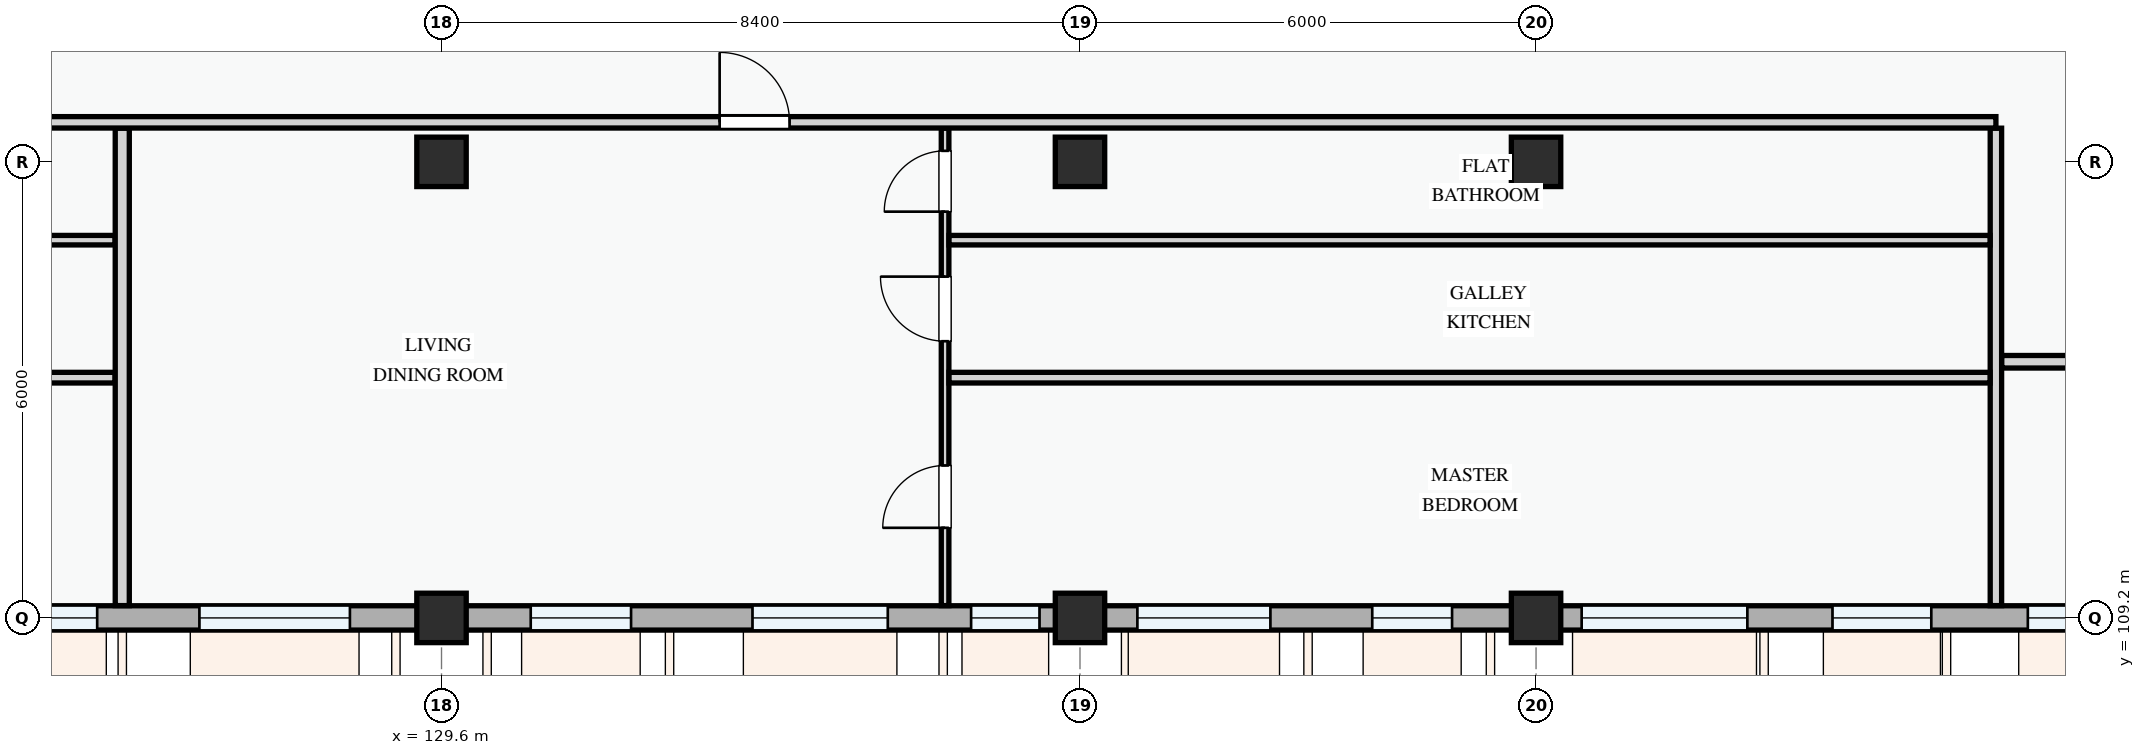
"""IFC4 building model, lengths in metres.
Left out: names, types, materials, properties, quantities, classifications, styles, units other than length and angle.
Written with IfcOpenShell. Run it as: python <this file> out.ifc"""

import sys

from ifc_helpers import new_model, si_unit, direction, frame, frame_2d, origin, origin_2d, place, context, subcontext, project, spatial, rectangle, extrude, element, fill, save


model = new_model("IFC4")
c1 = context("Model", 3, precision=1e-05, world=origin(), true_north=direction((0.0, 1.0)))
c2 = subcontext(c1, "Body", "Model", "MODEL_VIEW")
j1 = project(units=[si_unit("LENGTHUNIT", "METRE"), si_unit("PLANEANGLEUNIT", "RADIAN")], contexts=[c1])
p1 = place(None, origin())
s1 = spatial("IfcSite", under=j1, at=p1, CompositionType="ELEMENT")
p2 = place(p1, origin())
s2 = spatial("IfcBuilding", under=s1, at=p2, CompositionType="ELEMENT")
p3 = place(p2, frame((0.0, 0.0, 18.0)))
s3 = spatial("IfcBuildingStorey", under=s2, at=p3, CompositionType="ELEMENT", Elevation=18.0)
for number, where, z_axis, x_axis in (
    (1, (129.6, 109.2, 0.0), (0.0, 0.0, 1.0), (1.0, 0.0, 0.0)),
    (2, (129.6, 115.2, 0.0), (0.0, 0.0, 1.0), (1.0, 0.0, 0.0)),
    (3, (138.0, 109.2, 0.0), (0.0, 0.0, 1.0), (1.0, 0.0, 0.0)),
    (4, (138.0, 115.2, 0.0), (0.0, 0.0, 1.0), (1.0, 0.0, 0.0)),
    (5, (144.0, 109.2, 0.0), (0.0, 0.0, 1.0), (1.0, 0.0, 0.0)),
    (6, (144.0, 115.2, 0.0), (0.0, 0.0, 1.0), (1.0, 0.0, 0.0)),
):
    element("IfcColumn", number, at=place(p3, frame(where, z_axis=z_axis, x_axis=x_axis)), inside=s3, PredefinedType="COLUMN", context=c2, shape_type="SweptSolid", body=[
        extrude(rectangle(XDim=0.65, YDim=0.65, at=origin_2d()), origin(), (0.0, 0.0, 1.0), 3.3),
    ])
p4 = place(p3, frame((123.6, 109.2, 0.0), z_axis=(0.0, 0.0, 1.0), x_axis=(1.0, 0.0, 0.0)))
e7 = element("IfcWall", 7, at=p4, inside=s3, PredefinedType="STANDARD", context=c2, shape_type="SweptSolid", body=[
    extrude(rectangle(XDim=6.0, YDim=0.32, at=frame_2d((3.0, 0.0))), origin(), (0.0, 0.0, 1.0), 2.475),
])
p5 = place(p4, frame((0.52, 0.0, 0.78)))
e8 = element("IfcOpeningElement", 8, at=p5, cuts=e7, PredefinedType="OPENING", context=c2, shape_type="SweptSolid", body=[
    extrude(rectangle(XDim=0.95, YDim=1.15, at=frame_2d((0.475, 0.575))), frame((0.0, 0.17, 0.0), z_axis=(0.0, -1.0, 0.0), x_axis=(1.0, 0.0, 0.0)), (0.0, 0.0, 1.0), 0.34),
])
p6 = place(p4, frame((2.815, 0.0, 0.78)))
e9 = element("IfcOpeningElement", 9, at=p6, cuts=e7, PredefinedType="OPENING", context=c2, shape_type="SweptSolid", body=[
    extrude(rectangle(XDim=1.98, YDim=1.5, at=frame_2d((0.99, 0.75))), frame((0.0, 0.17, 0.0), z_axis=(0.0, -1.0, 0.0), x_axis=(1.0, 0.0, 0.0)), (0.0, 0.0, 1.0), 0.34),
])
p7 = place(p3, frame((129.6, 109.2, 0.0), z_axis=(0.0, 0.0, 1.0), x_axis=(1.0, 0.0, 0.0)))
e10 = element("IfcWall", 10, at=p7, inside=s3, PredefinedType="STANDARD", context=c2, shape_type="SweptSolid", body=[
    extrude(rectangle(XDim=8.4, YDim=0.32, at=frame_2d((4.2, 0.0))), origin(), (0.0, 0.0, 1.0), 2.375),
])
p8 = place(p7, frame((1.174, 0.0, 0.78)))
e11 = element("IfcOpeningElement", 11, at=p8, cuts=e10, PredefinedType="OPENING", context=c2, shape_type="SweptSolid", body=[
    extrude(rectangle(XDim=1.32, YDim=1.35, at=frame_2d((0.66, 0.675))), frame((0.0, 0.17, 0.0), z_axis=(0.0, -1.0, 0.0), x_axis=(1.0, 0.0, 0.0)), (0.0, 0.0, 1.0), 0.34),
])
p9 = place(p7, frame((4.091, 0.0, 0.78)))
e12 = element("IfcOpeningElement", 12, at=p9, cuts=e10, PredefinedType="OPENING", context=c2, shape_type="SweptSolid", body=[
    extrude(rectangle(XDim=1.78, YDim=1.42, at=frame_2d((0.89, 0.71))), frame((0.0, 0.17, 0.0), z_axis=(0.0, -1.0, 0.0), x_axis=(1.0, 0.0, 0.0)), (0.0, 0.0, 1.0), 0.34),
])
p10 = place(p7, frame((6.968, 0.0, 0.78)))
e13 = element("IfcOpeningElement", 13, at=p10, cuts=e10, PredefinedType="OPENING", context=c2, shape_type="SweptSolid", body=[
    extrude(rectangle(XDim=0.9, YDim=1.2, at=frame_2d((0.45, 0.6))), frame((0.0, 0.17, 0.0), z_axis=(0.0, -1.0, 0.0), x_axis=(1.0, 0.0, 0.0)), (0.0, 0.0, 1.0), 0.34),
])
p11 = place(p3, frame((138.0, 109.2, 0.0), z_axis=(0.0, 0.0, 1.0), x_axis=(1.0, 0.0, 0.0)))
e14 = element("IfcWall", 14, at=p11, inside=s3, PredefinedType="STANDARD", context=c2, shape_type="SweptSolid", body=[
    extrude(rectangle(XDim=6.0, YDim=0.32, at=frame_2d((3.0, 0.0))), origin(), (0.0, 0.0, 1.0), 2.475),
])
p12 = place(p11, frame((0.755, 0.0, 0.78)))
e15 = element("IfcOpeningElement", 15, at=p12, cuts=e14, PredefinedType="OPENING", context=c2, shape_type="SweptSolid", body=[
    extrude(rectangle(XDim=1.75, YDim=1.45, at=frame_2d((0.875, 0.725))), frame((0.0, 0.17, 0.0), z_axis=(0.0, -1.0, 0.0), x_axis=(1.0, 0.0, 0.0)), (0.0, 0.0, 1.0), 0.34),
])
p13 = place(p11, frame((3.845, 0.0, 0.78)))
e16 = element("IfcOpeningElement", 16, at=p13, cuts=e14, PredefinedType="OPENING", context=c2, shape_type="SweptSolid", body=[
    extrude(rectangle(XDim=1.05, YDim=1.2, at=frame_2d((0.525, 0.6))), frame((0.0, 0.17, 0.0), z_axis=(0.0, -1.0, 0.0), x_axis=(1.0, 0.0, 0.0)), (0.0, 0.0, 1.0), 0.34),
])
p14 = place(p3, frame((144.0, 109.2, 0.0), z_axis=(0.0, 0.0, 1.0), x_axis=(1.0, 0.0, 0.0)))
e17 = element("IfcWall", 17, at=p14, inside=s3, PredefinedType="STANDARD", context=c2, shape_type="SweptSolid", body=[
    extrude(rectangle(XDim=8.4, YDim=0.32, at=frame_2d((4.2, 0.0))), origin(), (0.0, 0.0, 1.0), 2.375),
])
p15 = place(p14, frame((0.6, 0.0, 0.78)))
e18 = element("IfcOpeningElement", 18, at=p15, cuts=e17, PredefinedType="OPENING", context=c2, shape_type="SweptSolid", body=[
    extrude(rectangle(XDim=2.18, YDim=1.48, at=frame_2d((1.09, 0.74))), frame((0.0, 0.17, 0.0), z_axis=(0.0, -1.0, 0.0), x_axis=(1.0, 0.0, 0.0)), (0.0, 0.0, 1.0), 0.34),
])
p16 = place(p14, frame((3.9, 0.0, 0.78)))
e19 = element("IfcOpeningElement", 19, at=p16, cuts=e17, PredefinedType="OPENING", context=c2, shape_type="SweptSolid", body=[
    extrude(rectangle(XDim=1.3, YDim=1.4, at=frame_2d((0.65, 0.7))), frame((0.0, 0.17, 0.0), z_axis=(0.0, -1.0, 0.0), x_axis=(1.0, 0.0, 0.0)), (0.0, 0.0, 1.0), 0.34),
])
p17 = place(p14, frame((6.47, 0.0, 0.78)))
e20 = element("IfcOpeningElement", 20, at=p17, cuts=e17, PredefinedType="OPENING", context=c2, shape_type="SweptSolid", body=[
    extrude(rectangle(XDim=1.32, YDim=1.35, at=frame_2d((0.66, 0.675))), frame((0.0, 0.17, 0.0), z_axis=(0.0, -1.0, 0.0), x_axis=(1.0, 0.0, 0.0)), (0.0, 0.0, 1.0), 0.34),
])
p18 = place(p3, frame((150.05, 109.362, 0.0), z_axis=(0.0, 0.0, 1.0), x_axis=(0.0, 1.0, 0.0)))
e21 = element("IfcWall", 21, at=p18, inside=s3, PredefinedType="PARTITIONING", context=c2, shape_type="SweptSolid", body=[
    extrude(rectangle(XDim=6.281, YDim=0.15, at=frame_2d((3.141, 0.0))), origin(), (0.0, 0.0, 1.0), 3.0),
])
p19 = place(p3, frame((150.127, 112.57, 0.0), z_axis=(0.0, 0.0, 1.0), x_axis=(1.0, 0.0, 0.0)))
e22 = element("IfcWall", 22, at=p19, inside=s3, PredefinedType="PARTITIONING", context=c2, shape_type="SweptSolid", body=[
    extrude(rectangle(XDim=2.413, YDim=0.165, at=frame_2d((1.207, 0.0))), origin(), (0.0, 0.0, 1.0), 3.0),
])
p20 = place(p3, frame((113.522, 112.361, 0.0), z_axis=(0.0, 0.0, 1.0), x_axis=(1.0, 0.0, 0.0)))
e23 = element("IfcWall", 23, at=p20, inside=s3, PredefinedType="PARTITIONING", context=c2, shape_type="SweptSolid", body=[
    extrude(rectangle(XDim=11.783, YDim=0.14, at=frame_2d((5.892, 0.0))), origin(), (0.0, 0.0, 1.0), 3.0),
])
p21 = place(p3, frame((113.522, 114.17, 0.0), z_axis=(0.0, 0.0, 1.0), x_axis=(1.0, 0.0, 0.0)))
e24 = element("IfcWall", 24, at=p21, inside=s3, PredefinedType="PARTITIONING", context=c2, shape_type="SweptSolid", body=[
    extrude(rectangle(XDim=11.783, YDim=0.125, at=frame_2d((5.892, 0.0))), origin(), (0.0, 0.0, 1.0), 3.0),
])
p22 = place(p3, frame((136.225, 109.362, 0.0), z_axis=(0.0, 0.0, 1.0), x_axis=(0.0, 1.0, 0.0)))
e25 = element("IfcWall", 25, at=p22, inside=s3, PredefinedType="PARTITIONING", context=c2, shape_type="SweptSolid", body=[
    extrude(rectangle(XDim=6.281, YDim=0.1, at=frame_2d((3.141, 0.0))), origin(), (0.0, 0.0, 1.0), 3.0),
])
p23 = place(p22, frame((1.023, 0.0, 0.0)))
e26 = element("IfcOpeningElement", 26, at=p23, cuts=e25, PredefinedType="OPENING", context=c2, shape_type="SweptSolid", body=[
    extrude(rectangle(XDim=0.82, YDim=2.08, at=frame_2d((0.41, 1.04))), frame((0.0, 0.06, 0.0), z_axis=(0.0, -1.0, 0.0), x_axis=(1.0, 0.0, 0.0)), (0.0, 0.0, 1.0), 0.12),
])
p24 = place(p22, frame((3.478, 0.0, 0.0)))
e27 = element("IfcOpeningElement", 27, at=p24, cuts=e25, PredefinedType="OPENING", context=c2, shape_type="SweptSolid", body=[
    extrude(rectangle(XDim=0.85, YDim=2.1, at=frame_2d((0.425, 1.05))), frame((0.0, 0.06, 0.0), z_axis=(0.0, -1.0, 0.0), x_axis=(1.0, 0.0, 0.0)), (0.0, 0.0, 1.0), 0.12),
])
p25 = place(p22, frame((5.183, 0.0, 0.0)))
e28 = element("IfcOpeningElement", 28, at=p25, cuts=e25, PredefinedType="OPENING", context=c2, shape_type="SweptSolid", body=[
    extrude(rectangle(XDim=0.8, YDim=2.1, at=frame_2d((0.4, 1.05))), frame((0.0, 0.06, 0.0), z_axis=(0.0, -1.0, 0.0), x_axis=(1.0, 0.0, 0.0)), (0.0, 0.0, 1.0), 0.12),
])
p26 = place(p3, frame((136.277, 112.361, 0.0), z_axis=(0.0, 0.0, 1.0), x_axis=(1.0, 0.0, 0.0)))
e29 = element("IfcWall", 29, at=p26, inside=s3, PredefinedType="PARTITIONING", context=c2, shape_type="SweptSolid", body=[
    extrude(rectangle(XDim=13.696, YDim=0.14, at=frame_2d((6.848, 0.0))), origin(), (0.0, 0.0, 1.0), 3.0),
])
p27 = place(p3, frame((136.277, 114.17, 0.0), z_axis=(0.0, 0.0, 1.0), x_axis=(1.0, 0.0, 0.0)))
e30 = element("IfcWall", 30, at=p27, inside=s3, PredefinedType="PARTITIONING", context=c2, shape_type="SweptSolid", body=[
    extrude(rectangle(XDim=13.696, YDim=0.125, at=frame_2d((6.848, 0.0))), origin(), (0.0, 0.0, 1.0), 3.0),
])
p28 = place(p3, frame((125.4, 109.362, 0.0), z_axis=(0.0, 0.0, 1.0), x_axis=(0.0, 1.0, 0.0)))
e31 = element("IfcWall", 31, at=p28, inside=s3, PredefinedType="PARTITIONING", context=c2, shape_type="SweptSolid", body=[
    extrude(rectangle(XDim=6.281, YDim=0.185, at=frame_2d((3.141, 0.0))), origin(), (0.0, 0.0, 1.0), 3.0),
])
p29 = place(p3, frame((80.562, 115.72, 0.0), z_axis=(0.0, 0.0, 1.0), x_axis=(1.0, 0.0, 0.0)))
e32 = element("IfcWall", 32, at=p29, inside=s3, PredefinedType="PARTITIONING", context=c2, shape_type="SweptSolid", body=[
    extrude(rectangle(XDim=69.488, YDim=0.15, at=frame_2d((34.744, 0.0))), origin(), (0.0, 0.0, 1.0), 3.0),
])
p30 = place(p29, frame((9.429, 0.0, 0.0)))
e33 = element("IfcOpeningElement", 33, at=p30, cuts=e32, PredefinedType="OPENING", context=c2, shape_type="SweptSolid", body=[
    extrude(rectangle(XDim=0.96, YDim=2.12, at=frame_2d((0.48, 1.06))), frame((0.0, 0.085, 0.0), z_axis=(0.0, -1.0, 0.0), x_axis=(1.0, 0.0, 0.0)), (0.0, 0.0, 1.0), 0.17),
])
p31 = place(p29, frame((24.004, 0.0, 0.0)))
e34 = element("IfcOpeningElement", 34, at=p31, cuts=e32, PredefinedType="OPENING", context=c2, shape_type="SweptSolid", body=[
    extrude(rectangle(XDim=0.92, YDim=2.1, at=frame_2d((0.46, 1.05))), frame((0.0, 0.085, 0.0), z_axis=(0.0, -1.0, 0.0), x_axis=(1.0, 0.0, 0.0)), (0.0, 0.0, 1.0), 0.17),
])
p32 = place(p29, frame((52.697, 0.0, 0.0)))
e35 = element("IfcOpeningElement", 35, at=p32, cuts=e32, PredefinedType="OPENING", context=c2, shape_type="SweptSolid", body=[
    extrude(rectangle(XDim=0.92, YDim=2.1, at=frame_2d((0.46, 1.05))), frame((0.0, 0.085, 0.0), z_axis=(0.0, -1.0, 0.0), x_axis=(1.0, 0.0, 0.0)), (0.0, 0.0, 1.0), 0.17),
])
p33 = place(p5, origin())
e36 = element("IfcWindow", 36, at=p33, inside=s3, PartitioningType="SINGLE_PANEL", PredefinedType="WINDOW", context=c2, shape_type="SweptSolid", body=[
    extrude(rectangle(XDim=0.95, YDim=1.15, at=frame_2d((0.475, 0.575))), frame((0.0, 0.03, 0.0), z_axis=(0.0, -1.0, 0.0), x_axis=(1.0, 0.0, 0.0)), (0.0, 0.0, 1.0), 0.06),
])
fill(e8, e36)
p34 = place(p6, origin())
e37 = element("IfcWindow", 37, at=p34, inside=s3, PartitioningType="DOUBLE_PANEL_VERTICAL", PredefinedType="WINDOW", context=c2, shape_type="SweptSolid", body=[
    extrude(rectangle(XDim=1.98, YDim=1.5, at=frame_2d((0.99, 0.75))), frame((0.0, 0.03, 0.0), z_axis=(0.0, -1.0, 0.0), x_axis=(1.0, 0.0, 0.0)), (0.0, 0.0, 1.0), 0.06),
])
fill(e9, e37)
p35 = place(p8, origin())
e38 = element("IfcWindow", 38, at=p35, inside=s3, PartitioningType="SINGLE_PANEL", PredefinedType="WINDOW", context=c2, shape_type="SweptSolid", body=[
    extrude(rectangle(XDim=1.32, YDim=1.35, at=frame_2d((0.66, 0.675))), frame((0.0, 0.03, 0.0), z_axis=(0.0, -1.0, 0.0), x_axis=(1.0, 0.0, 0.0)), (0.0, 0.0, 1.0), 0.06),
])
fill(e11, e38)
p36 = place(p9, origin())
e39 = element("IfcWindow", 39, at=p36, inside=s3, PartitioningType="DOUBLE_PANEL_VERTICAL", PredefinedType="WINDOW", context=c2, shape_type="SweptSolid", body=[
    extrude(rectangle(XDim=1.78, YDim=1.42, at=frame_2d((0.89, 0.71))), frame((0.0, 0.03, 0.0), z_axis=(0.0, -1.0, 0.0), x_axis=(1.0, 0.0, 0.0)), (0.0, 0.0, 1.0), 0.06),
])
fill(e12, e39)
p37 = place(p10, origin())
e40 = element("IfcWindow", 40, at=p37, inside=s3, PartitioningType="SINGLE_PANEL", PredefinedType="WINDOW", context=c2, shape_type="SweptSolid", body=[
    extrude(rectangle(XDim=0.9, YDim=1.2, at=frame_2d((0.45, 0.6))), frame((0.0, 0.03, 0.0), z_axis=(0.0, -1.0, 0.0), x_axis=(1.0, 0.0, 0.0)), (0.0, 0.0, 1.0), 0.06),
])
fill(e13, e40)
p38 = place(p12, origin())
e41 = element("IfcWindow", 41, at=p38, inside=s3, PartitioningType="DOUBLE_PANEL_VERTICAL", PredefinedType="WINDOW", context=c2, shape_type="SweptSolid", body=[
    extrude(rectangle(XDim=1.75, YDim=1.45, at=frame_2d((0.875, 0.725))), frame((0.0, 0.03, 0.0), z_axis=(0.0, -1.0, 0.0), x_axis=(1.0, 0.0, 0.0)), (0.0, 0.0, 1.0), 0.06),
])
fill(e15, e41)
p39 = place(p13, origin())
e42 = element("IfcWindow", 42, at=p39, inside=s3, PartitioningType="SINGLE_PANEL", PredefinedType="WINDOW", context=c2, shape_type="SweptSolid", body=[
    extrude(rectangle(XDim=1.05, YDim=1.2, at=frame_2d((0.525, 0.6))), frame((0.0, 0.03, 0.0), z_axis=(0.0, -1.0, 0.0), x_axis=(1.0, 0.0, 0.0)), (0.0, 0.0, 1.0), 0.06),
])
fill(e16, e42)
p40 = place(p15, origin())
e43 = element("IfcWindow", 43, at=p40, inside=s3, PartitioningType="DOUBLE_PANEL_VERTICAL", PredefinedType="WINDOW", context=c2, shape_type="SweptSolid", body=[
    extrude(rectangle(XDim=2.18, YDim=1.48, at=frame_2d((1.09, 0.74))), frame((0.0, 0.03, 0.0), z_axis=(0.0, -1.0, 0.0), x_axis=(1.0, 0.0, 0.0)), (0.0, 0.0, 1.0), 0.06),
])
fill(e18, e43)
p41 = place(p16, origin())
e44 = element("IfcWindow", 44, at=p41, inside=s3, PartitioningType="SINGLE_PANEL", PredefinedType="WINDOW", context=c2, shape_type="SweptSolid", body=[
    extrude(rectangle(XDim=1.3, YDim=1.4, at=frame_2d((0.65, 0.7))), frame((0.0, 0.03, 0.0), z_axis=(0.0, -1.0, 0.0), x_axis=(1.0, 0.0, 0.0)), (0.0, 0.0, 1.0), 0.06),
])
fill(e19, e44)
p42 = place(p17, origin())
e45 = element("IfcWindow", 45, at=p42, inside=s3, PartitioningType="SINGLE_PANEL", PredefinedType="WINDOW", context=c2, shape_type="SweptSolid", body=[
    extrude(rectangle(XDim=1.32, YDim=1.35, at=frame_2d((0.66, 0.675))), frame((0.0, 0.03, 0.0), z_axis=(0.0, -1.0, 0.0), x_axis=(1.0, 0.0, 0.0)), (0.0, 0.0, 1.0), 0.06),
])
fill(e20, e45)
p43 = place(p23, origin())
e46 = element("IfcDoor", 46, at=p43, inside=s3, OperationType="SINGLE_SWING_LEFT", PredefinedType="DOOR", context=c2, shape_type="SweptSolid", body=[
    extrude(rectangle(XDim=0.82, YDim=2.08, at=frame_2d((0.41, 1.04))), frame((0.0, 0.025, 0.0), z_axis=(0.0, -1.0, 0.0), x_axis=(1.0, 0.0, 0.0)), (0.0, 0.0, 1.0), 0.05),
])
fill(e26, e46)
p44 = place(p24, origin())
e47 = element("IfcDoor", 47, at=p44, inside=s3, OperationType="SINGLE_SWING_RIGHT", PredefinedType="DOOR", context=c2, shape_type="SweptSolid", body=[
    extrude(rectangle(XDim=0.85, YDim=2.1, at=frame_2d((0.425, 1.05))), frame((0.0, 0.025, 0.0), z_axis=(0.0, -1.0, 0.0), x_axis=(1.0, 0.0, 0.0)), (0.0, 0.0, 1.0), 0.05),
])
fill(e27, e47)
p45 = place(p25, origin())
e48 = element("IfcDoor", 48, at=p45, inside=s3, OperationType="SINGLE_SWING_LEFT", PredefinedType="DOOR", context=c2, shape_type="SweptSolid", body=[
    extrude(rectangle(XDim=0.8, YDim=2.1, at=frame_2d((0.4, 1.05))), frame((0.0, 0.025, 0.0), z_axis=(0.0, -1.0, 0.0), x_axis=(1.0, 0.0, 0.0)), (0.0, 0.0, 1.0), 0.05),
])
fill(e28, e48)
p46 = place(p32, origin())
e49 = element("IfcDoor", 49, at=p46, inside=s3, OperationType="SINGLE_SWING_LEFT", PredefinedType="DOOR", context=c2, shape_type="SweptSolid", body=[
    extrude(rectangle(XDim=0.92, YDim=2.1, at=frame_2d((0.46, 1.05))), frame((0.0, 0.025, 0.0), z_axis=(0.0, -1.0, 0.0), x_axis=(1.0, 0.0, 0.0)), (0.0, 0.0, 1.0), 0.05),
])
fill(e35, e49)
save(model, sys.argv[1])
